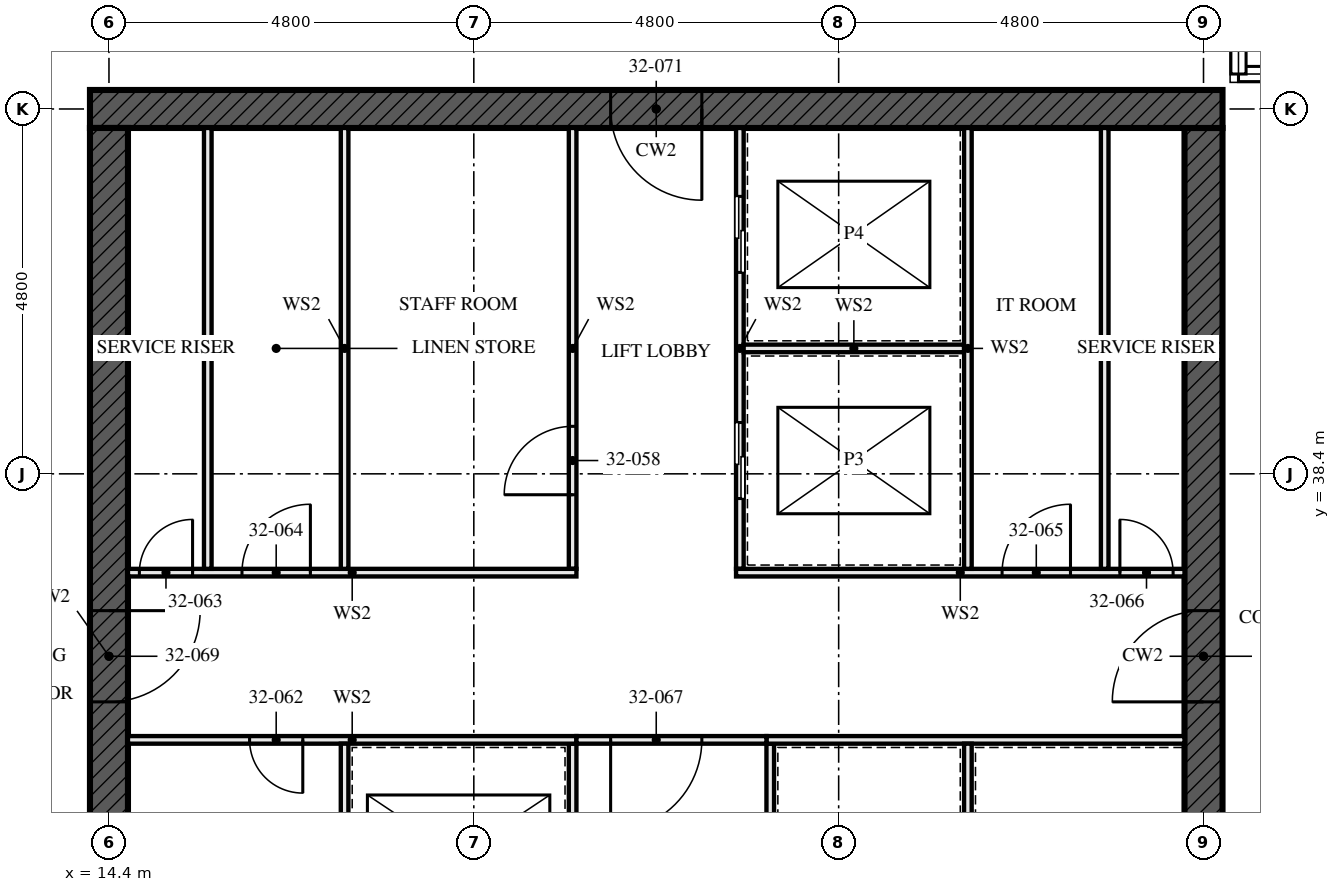
"""IFC4 building model, lengths in metres.
Left out: names, types, materials, properties, quantities, classifications, styles, units other than length and angle.
Written with IfcOpenShell. Run it as: python <this file> out.ifc"""

import sys

from ifc_helpers import new_model, si_unit, direction, frame, frame_2d, origin, place, context, subcontext, project, spatial, rectangle, extrude, element, fill, save


model = new_model("IFC4")
c1 = context("Model", 3, precision=1e-05, world=origin(), true_north=direction((0.0, 1.0)))
c2 = subcontext(c1, "Body", "Model", "MODEL_VIEW")
j1 = project(units=[si_unit("LENGTHUNIT", "METRE"), si_unit("PLANEANGLEUNIT", "RADIAN")], contexts=[c1])
p1 = place(None, origin())
s1 = spatial("IfcSite", under=j1, at=p1, CompositionType="ELEMENT")
p2 = place(p1, origin())
s2 = spatial("IfcBuilding", under=s1, at=p2, CompositionType="ELEMENT")
p3 = place(p2, frame((0.0, 0.0, 119.0)))
s3 = spatial("IfcBuildingStorey", under=s2, at=p3, CompositionType="ELEMENT", Elevation=119.0)
p4 = place(p3, frame((29.05, 43.2, -0.17), z_axis=(0.0, 0.0, 1.0), x_axis=(-1.0, 0.0, 0.0)))
e1 = element("IfcWall", 1, at=p4, inside=s3, PredefinedType="SHEAR", context=c2, shape_type="SweptSolid", body=[
    extrude(rectangle(XDim=14.9, YDim=0.5, at=frame_2d((7.45, 0.0))), origin(), (0.0, 0.0, 1.0), 3.5),
])
p5 = place(p4, frame((6.85, 0.0, 0.17)))
e2 = element("IfcOpeningElement", 2, at=p5, cuts=e1, PredefinedType="OPENING", context=c2, shape_type="SweptSolid", body=[
    extrude(rectangle(XDim=1.2, YDim=2.1, at=frame_2d((0.6, 1.05))), frame((0.0, 0.26, 0.0), z_axis=(0.0, -1.0, 0.0), x_axis=(1.0, 0.0, 0.0)), (0.0, 0.0, 1.0), 0.521),
])
p6 = place(p3, frame((14.4, 42.95, -0.17), z_axis=(0.0, 0.0, 1.0), x_axis=(0.0, -1.0, 0.0)))
e3 = element("IfcWall", 3, at=p6, inside=s3, PredefinedType="SHEAR", context=c2, shape_type="SweptSolid", body=[
    extrude(rectangle(XDim=13.9, YDim=0.5, at=frame_2d((6.95, 0.0))), origin(), (0.0, 0.0, 1.0), 3.5),
])
p7 = place(p6, frame((6.35, 0.0, 0.17)))
e4 = element("IfcOpeningElement", 4, at=p7, cuts=e3, PredefinedType="OPENING", context=c2, shape_type="SweptSolid", body=[
    extrude(rectangle(XDim=1.2, YDim=2.1, at=frame_2d((0.6, 1.05))), frame((0.0, 0.26, 0.0), z_axis=(0.0, -1.0, 0.0), x_axis=(1.0, 0.0, 0.0)), (0.0, 0.0, 1.0), 0.521),
])
p8 = place(p3, frame((28.8, 29.05, -0.17), z_axis=(0.0, 0.0, 1.0), x_axis=(0.0, 1.0, 0.0)))
e5 = element("IfcWall", 5, at=p8, inside=s3, PredefinedType="SHEAR", context=c2, shape_type="SweptSolid", body=[
    extrude(rectangle(XDim=13.9, YDim=0.5, at=frame_2d((6.95, 0.0))), origin(), (0.0, 0.0, 1.0), 3.5),
])
p9 = place(p8, frame((6.35, 0.0, 0.17)))
e6 = element("IfcOpeningElement", 6, at=p9, cuts=e5, PredefinedType="OPENING", context=c2, shape_type="SweptSolid", body=[
    extrude(rectangle(XDim=1.2, YDim=2.1, at=frame_2d((0.6, 1.05))), frame((0.0, 0.26, 0.0), z_axis=(0.0, -1.0, 0.0), x_axis=(1.0, 0.0, 0.0)), (0.0, 0.0, 1.0), 0.521),
])
for number, where, z_axis, x_axis in (
    (7, (15.7, 37.15, 0.0), (0.0, 0.0, 1.0), (0.0, 1.0, 0.0)),
    (8, (27.5, 37.15, 0.0), (0.0, 0.0, 1.0), (0.0, 1.0, 0.0)),
):
    element("IfcWall", number, at=place(p3, frame(where, z_axis=z_axis, x_axis=x_axis)), inside=s3, PredefinedType="SOLIDWALL", context=c2, shape_type="SweptSolid", body=[
        extrude(rectangle(XDim=5.8, YDim=0.1, at=frame_2d((2.9, 0.0))), origin(), (0.0, 0.0, 1.0), 3.33),
    ])
p10 = place(p3, frame((20.5, 29.05, 0.0), z_axis=(0.0, 0.0, 1.0), x_axis=(0.0, 1.0, 0.0)))
e9 = element("IfcWall", 9, at=p10, inside=s3, PredefinedType="SOLIDWALL", context=c2, shape_type="SweptSolid", body=[
    extrude(rectangle(XDim=5.8, YDim=0.1, at=frame_2d((2.9, 0.0))), origin(), (0.0, 0.0, 1.0), 3.33),
])
p11 = place(p10, frame((0.8, 0.0, 0.0)))
e10 = element("IfcOpeningElement", 10, at=p11, cuts=e9, PredefinedType="OPENING", context=c2, shape_type="SweptSolid", body=[
    extrude(rectangle(XDim=1.1, YDim=2.3, at=frame_2d((0.55, 1.15))), frame((0.0, 0.061, 0.0), z_axis=(0.0, -1.0, 0.0), x_axis=(1.0, 0.0, 0.0)), (0.0, 0.0, 1.0), 0.121),
])
p12 = place(p10, frame((3.775, 0.0, 0.0)))
e11 = element("IfcOpeningElement", 11, at=p12, cuts=e9, PredefinedType="OPENING", context=c2, shape_type="SweptSolid", body=[
    extrude(rectangle(XDim=1.1, YDim=2.3, at=frame_2d((0.55, 1.15))), frame((0.0, 0.061, 0.0), z_axis=(0.0, -1.0, 0.0), x_axis=(1.0, 0.0, 0.0)), (0.0, 0.0, 1.0), 0.121),
])
p13 = place(p3, frame((20.5, 37.15, 0.0), z_axis=(0.0, 0.0, 1.0), x_axis=(0.0, 1.0, 0.0)))
e12 = element("IfcWall", 12, at=p13, inside=s3, PredefinedType="SOLIDWALL", context=c2, shape_type="SweptSolid", body=[
    extrude(rectangle(XDim=5.8, YDim=0.1, at=frame_2d((2.9, 0.0))), origin(), (0.0, 0.0, 1.0), 3.33),
])
p14 = place(p13, frame((0.975, 0.0, 0.0)))
e13 = element("IfcOpeningElement", 13, at=p14, cuts=e12, PredefinedType="OPENING", context=c2, shape_type="SweptSolid", body=[
    extrude(rectangle(XDim=0.9, YDim=2.1, at=frame_2d((0.45, 1.05))), frame((0.0, 0.061, 0.0), z_axis=(0.0, -1.0, 0.0), x_axis=(1.0, 0.0, 0.0)), (0.0, 0.0, 1.0), 0.121),
])
p15 = place(p3, frame((22.7, 37.15, 0.0), z_axis=(0.0, 0.0, 1.0), x_axis=(0.0, 1.0, 0.0)))
e14 = element("IfcWall", 14, at=p15, inside=s3, PredefinedType="SOLIDWALL", context=c2, shape_type="SweptSolid", body=[
    extrude(rectangle(XDim=5.8, YDim=0.1, at=frame_2d((2.9, 0.0))), origin(), (0.0, 0.0, 1.0), 3.33),
])
p16 = place(p15, frame((0.925, 0.0, 0.0)))
e15 = element("IfcOpeningElement", 15, at=p16, cuts=e14, PredefinedType="OPENING", context=c2, shape_type="SweptSolid", body=[
    extrude(rectangle(XDim=1.0, YDim=2.1, at=frame_2d((0.5, 1.05))), frame((0.0, 0.061, 0.0), z_axis=(0.0, -1.0, 0.0), x_axis=(1.0, 0.0, 0.0)), (0.0, 0.0, 1.0), 0.121),
])
p17 = place(p15, frame((3.9, 0.0, 0.0)))
e16 = element("IfcOpeningElement", 16, at=p17, cuts=e14, PredefinedType="OPENING", context=c2, shape_type="SweptSolid", body=[
    extrude(rectangle(XDim=1.0, YDim=2.1, at=frame_2d((0.5, 1.05))), frame((0.0, 0.061, 0.0), z_axis=(0.0, -1.0, 0.0), x_axis=(1.0, 0.0, 0.0)), (0.0, 0.0, 1.0), 0.121),
])
p18 = place(p3, frame((23.1, 29.05, 0.0), z_axis=(0.0, 0.0, 1.0), x_axis=(0.0, 1.0, 0.0)))
e17 = element("IfcWall", 17, at=p18, inside=s3, PredefinedType="SOLIDWALL", context=c2, shape_type="SweptSolid", body=[
    extrude(rectangle(XDim=5.8, YDim=0.1, at=frame_2d((2.9, 0.0))), origin(), (0.0, 0.0, 1.0), 3.33),
])
p19 = place(p18, frame((1.0, 0.0, 0.0)))
e18 = element("IfcOpeningElement", 18, at=p19, cuts=e17, PredefinedType="OPENING", context=c2, shape_type="SweptSolid", body=[
    extrude(rectangle(XDim=0.7, YDim=2.1, at=frame_2d((0.35, 1.05))), frame((0.0, 0.061, 0.0), z_axis=(0.0, -1.0, 0.0), x_axis=(1.0, 0.0, 0.0)), (0.0, 0.0, 1.0), 0.121),
])
p20 = place(p3, frame((14.65, 34.9, 0.0), z_axis=(0.0, 0.0, 1.0), x_axis=(1.0, 0.0, 0.0)))
e19 = element("IfcWall", 19, at=p20, inside=s3, PredefinedType="SOLIDWALL", context=c2, shape_type="SweptSolid", body=[
    extrude(rectangle(XDim=5.9, YDim=0.1, at=frame_2d((2.95, 0.0))), origin(), (0.0, 0.0, 1.0), 3.33),
])
p21 = place(p20, frame((1.6, 0.0, 0.0)))
e20 = element("IfcOpeningElement", 20, at=p21, cuts=e19, PredefinedType="OPENING", context=c2, shape_type="SweptSolid", body=[
    extrude(rectangle(XDim=0.7, YDim=2.1, at=frame_2d((0.35, 1.05))), frame((0.0, 0.061, 0.0), z_axis=(0.0, -1.0, 0.0), x_axis=(1.0, 0.0, 0.0)), (0.0, 0.0, 1.0), 0.121),
])
p22 = place(p3, frame((23.05, 34.9, 0.0), z_axis=(0.0, 0.0, 1.0), x_axis=(1.0, 0.0, 0.0)))
e21 = element("IfcWall", 21, at=p22, inside=s3, PredefinedType="SOLIDWALL", context=c2, shape_type="SweptSolid", body=[
    extrude(rectangle(XDim=5.5, YDim=0.1, at=frame_2d((2.75, 0.0))), origin(), (0.0, 0.0, 1.0), 3.33),
])
p23 = place(p3, frame((14.65, 37.1, 0.0), z_axis=(0.0, 0.0, 1.0), x_axis=(1.0, 0.0, 0.0)))
e22 = element("IfcWall", 22, at=p23, inside=s3, PredefinedType="SOLIDWALL", context=c2, shape_type="SweptSolid", body=[
    extrude(rectangle(XDim=5.9, YDim=0.1, at=frame_2d((2.95, 0.0))), origin(), (0.0, 0.0, 1.0), 3.33),
])
p24 = place(p23, frame((0.15, 0.0, 0.0)))
e23 = element("IfcOpeningElement", 23, at=p24, cuts=e22, PredefinedType="OPENING", context=c2, shape_type="SweptSolid", body=[
    extrude(rectangle(XDim=0.7, YDim=2.1, at=frame_2d((0.35, 1.05))), frame((0.0, 0.061, 0.0), z_axis=(0.0, -1.0, 0.0), x_axis=(1.0, 0.0, 0.0)), (0.0, 0.0, 1.0), 0.121),
])
p25 = place(p23, frame((1.5, 0.0, 0.0)))
e24 = element("IfcOpeningElement", 24, at=p25, cuts=e22, PredefinedType="OPENING", context=c2, shape_type="SweptSolid", body=[
    extrude(rectangle(XDim=0.9, YDim=2.1, at=frame_2d((0.45, 1.05))), frame((0.0, 0.061, 0.0), z_axis=(0.0, -1.0, 0.0), x_axis=(1.0, 0.0, 0.0)), (0.0, 0.0, 1.0), 0.121),
])
p26 = place(p3, frame((22.65, 37.1, 0.0), z_axis=(0.0, 0.0, 1.0), x_axis=(1.0, 0.0, 0.0)))
e25 = element("IfcWall", 25, at=p26, inside=s3, PredefinedType="SOLIDWALL", context=c2, shape_type="SweptSolid", body=[
    extrude(rectangle(XDim=5.9, YDim=0.1, at=frame_2d((2.95, 0.0))), origin(), (0.0, 0.0, 1.0), 3.33),
])
p27 = place(p26, frame((3.5, 0.0, 0.0)))
e26 = element("IfcOpeningElement", 26, at=p27, cuts=e25, PredefinedType="OPENING", context=c2, shape_type="SweptSolid", body=[
    extrude(rectangle(XDim=0.9, YDim=2.1, at=frame_2d((0.45, 1.05))), frame((0.0, 0.061, 0.0), z_axis=(0.0, -1.0, 0.0), x_axis=(1.0, 0.0, 0.0)), (0.0, 0.0, 1.0), 0.121),
])
p28 = place(p26, frame((5.05, 0.0, 0.0)))
e27 = element("IfcOpeningElement", 27, at=p28, cuts=e25, PredefinedType="OPENING", context=c2, shape_type="SweptSolid", body=[
    extrude(rectangle(XDim=0.7, YDim=2.1, at=frame_2d((0.35, 1.05))), frame((0.0, 0.061, 0.0), z_axis=(0.0, -1.0, 0.0), x_axis=(1.0, 0.0, 0.0)), (0.0, 0.0, 1.0), 0.121),
])
p29 = place(p3, frame((20.55, 34.9, 0.0), z_axis=(0.0, 0.0, 1.0), x_axis=(1.0, 0.0, 0.0)))
e28 = element("IfcWall", 28, at=p29, inside=s3, PredefinedType="SOLIDWALL", context=c2, shape_type="SweptSolid", body=[
    extrude(rectangle(XDim=2.5, YDim=0.1, at=frame_2d((1.25, 0.0))), origin(), (0.0, 0.0, 1.0), 3.33),
])
p30 = place(p29, frame((0.45, 0.0, 0.0)))
e29 = element("IfcOpeningElement", 29, at=p30, cuts=e28, PredefinedType="OPENING", context=c2, shape_type="SweptSolid", body=[
    extrude(rectangle(XDim=1.2, YDim=2.1, at=frame_2d((0.6, 1.05))), frame((0.0, 0.061, 0.0), z_axis=(0.0, -1.0, 0.0), x_axis=(1.0, 0.0, 0.0)), (0.0, 0.0, 1.0), 0.121),
])
for number, where, z_axis, x_axis in (
    (30, (17.5, 29.05, 0.0), (0.0, 0.0, 1.0), (0.0, 1.0, 0.0)),
    (31, (17.5, 37.15, 0.0), (0.0, 0.0, 1.0), (0.0, 1.0, 0.0)),
):
    element("IfcWall", number, at=place(p3, frame(where, z_axis=z_axis, x_axis=x_axis)), inside=s3, PredefinedType="SOLIDWALL", context=c2, shape_type="SweptSolid", body=[
        extrude(rectangle(XDim=5.8, YDim=0.1, at=frame_2d((2.9, 0.0))), origin(), (0.0, 0.0, 1.0), 3.33),
    ])
p31 = place(p3, frame((22.75, 40.05, 0.0), z_axis=(0.0, 0.0, 1.0), x_axis=(1.0, 0.0, 0.0)))
e32 = element("IfcWall", 32, at=p31, inside=s3, PredefinedType="SOLIDWALL", context=c2, shape_type="SweptSolid", body=[
    extrude(rectangle(XDim=2.9, YDim=0.1, at=frame_2d((1.45, 0.0))), origin(), (0.0, 0.0, 1.0), 3.33),
])
p32 = place(p3, frame((25.7, 37.15, 0.0), z_axis=(0.0, 0.0, 1.0), x_axis=(0.0, 1.0, 0.0)))
e33 = element("IfcWall", 33, at=p32, inside=s3, PredefinedType="SOLIDWALL", context=c2, shape_type="SweptSolid", body=[
    extrude(rectangle(XDim=5.8, YDim=0.1, at=frame_2d((2.9, 0.0))), origin(), (0.0, 0.0, 1.0), 3.33),
])
p33 = place(p3, frame((25.7, 31.95, 0.0), z_axis=(0.0, 0.0, 1.0), x_axis=(0.0, 1.0, 0.0)))
e34 = element("IfcWall", 34, at=p33, inside=s3, PredefinedType="SOLIDWALL", context=c2, shape_type="SweptSolid", body=[
    extrude(rectangle(XDim=2.9, YDim=0.1, at=frame_2d((1.45, 0.0))), origin(), (0.0, 0.0, 1.0), 3.33),
])
p34 = place(p14, origin())
e35 = element("IfcDoor", 35, at=p34, inside=s3, OperationType="SINGLE_SWING_RIGHT", PredefinedType="DOOR", context=c2, shape_type="SweptSolid", body=[
    extrude(rectangle(XDim=0.9, YDim=2.1, at=frame_2d((0.45, 1.05))), frame((0.0, 0.027, 0.0), z_axis=(0.0, -1.0, 0.0), x_axis=(1.0, 0.0, 0.0)), (0.0, 0.0, 1.0), 0.054),
])
fill(e13, e35)
p35 = place(p16, origin())
e36 = element("IfcDoor", 36, at=p35, inside=s3, OperationType="SLIDING_TO_LEFT", PredefinedType="DOOR", context=c2, shape_type="SweptSolid", body=[
    extrude(rectangle(XDim=1.0, YDim=2.1, at=frame_2d((0.5, 1.05))), frame((0.0, 0.05, 0.0), z_axis=(0.0, -1.0, 0.0), x_axis=(1.0, 0.0, 0.0)), (0.0, 0.0, 1.0), 0.1),
])
fill(e15, e36)
p36 = place(p17, origin())
e37 = element("IfcDoor", 37, at=p36, inside=s3, OperationType="SLIDING_TO_LEFT", PredefinedType="DOOR", context=c2, shape_type="SweptSolid", body=[
    extrude(rectangle(XDim=1.0, YDim=2.1, at=frame_2d((0.5, 1.05))), frame((0.0, 0.05, 0.0), z_axis=(0.0, -1.0, 0.0), x_axis=(1.0, 0.0, 0.0)), (0.0, 0.0, 1.0), 0.1),
])
fill(e16, e37)
p37 = place(p21, frame((0.7, 0.0, 0.0), z_axis=(0.0, 0.0, 1.0), x_axis=(-1.0, 0.0, 0.0)))
e38 = element("IfcDoor", 38, at=p37, inside=s3, OperationType="SINGLE_SWING_RIGHT", PredefinedType="DOOR", context=c2, shape_type="SweptSolid", body=[
    extrude(rectangle(XDim=0.7, YDim=2.1, at=frame_2d((0.35, 1.05))), frame((0.0, 0.027, 0.0), z_axis=(0.0, -1.0, 0.0), x_axis=(1.0, 0.0, 0.0)), (0.0, 0.0, 1.0), 0.054),
])
fill(e20, e38)
p38 = place(p24, origin())
e39 = element("IfcDoor", 39, at=p38, inside=s3, OperationType="SINGLE_SWING_LEFT", PredefinedType="DOOR", context=c2, shape_type="SweptSolid", body=[
    extrude(rectangle(XDim=0.7, YDim=2.1, at=frame_2d((0.35, 1.05))), frame((0.0, 0.027, 0.0), z_axis=(0.0, -1.0, 0.0), x_axis=(1.0, 0.0, 0.0)), (0.0, 0.0, 1.0), 0.054),
])
fill(e23, e39)
p39 = place(p25, origin())
e40 = element("IfcDoor", 40, at=p39, inside=s3, OperationType="SINGLE_SWING_LEFT", PredefinedType="DOOR", context=c2, shape_type="SweptSolid", body=[
    extrude(rectangle(XDim=0.9, YDim=2.1, at=frame_2d((0.45, 1.05))), frame((0.0, 0.027, 0.0), z_axis=(0.0, -1.0, 0.0), x_axis=(1.0, 0.0, 0.0)), (0.0, 0.0, 1.0), 0.054),
])
fill(e24, e40)
p40 = place(p27, origin())
e41 = element("IfcDoor", 41, at=p40, inside=s3, OperationType="SINGLE_SWING_LEFT", PredefinedType="DOOR", context=c2, shape_type="SweptSolid", body=[
    extrude(rectangle(XDim=0.9, YDim=2.1, at=frame_2d((0.45, 1.05))), frame((0.0, 0.027, 0.0), z_axis=(0.0, -1.0, 0.0), x_axis=(1.0, 0.0, 0.0)), (0.0, 0.0, 1.0), 0.054),
])
fill(e26, e41)
p41 = place(p28, origin())
e42 = element("IfcDoor", 42, at=p41, inside=s3, OperationType="SINGLE_SWING_RIGHT", PredefinedType="DOOR", context=c2, shape_type="SweptSolid", body=[
    extrude(rectangle(XDim=0.7, YDim=2.1, at=frame_2d((0.35, 1.05))), frame((0.0, 0.027, 0.0), z_axis=(0.0, -1.0, 0.0), x_axis=(1.0, 0.0, 0.0)), (0.0, 0.0, 1.0), 0.054),
])
fill(e27, e42)
p42 = place(p30, frame((1.2, 0.0, 0.0), z_axis=(0.0, 0.0, 1.0), x_axis=(-1.0, 0.0, 0.0)))
e43 = element("IfcDoor", 43, at=p42, inside=s3, OperationType="SINGLE_SWING_LEFT", PredefinedType="DOOR", context=c2, shape_type="SweptSolid", body=[
    extrude(rectangle(XDim=1.2, YDim=2.1, at=frame_2d((0.6, 1.05))), frame((0.0, 0.027, 0.0), z_axis=(0.0, -1.0, 0.0), x_axis=(1.0, 0.0, 0.0)), (0.0, 0.0, 1.0), 0.054),
])
fill(e29, e43)
p43 = place(p7, origin())
e44 = element("IfcDoor", 44, at=p43, inside=s3, OperationType="SINGLE_SWING_LEFT", PredefinedType="DOOR", context=c2, shape_type="SweptSolid", body=[
    extrude(rectangle(XDim=1.2, YDim=2.1, at=frame_2d((0.6, 1.05))), frame((0.0, 0.027, 0.0), z_axis=(0.0, -1.0, 0.0), x_axis=(1.0, 0.0, 0.0)), (0.0, 0.0, 1.0), 0.054),
])
fill(e4, e44)
p44 = place(p9, origin())
e45 = element("IfcDoor", 45, at=p44, inside=s3, OperationType="SINGLE_SWING_LEFT", PredefinedType="DOOR", context=c2, shape_type="SweptSolid", body=[
    extrude(rectangle(XDim=1.2, YDim=2.1, at=frame_2d((0.6, 1.05))), frame((0.0, 0.027, 0.0), z_axis=(0.0, -1.0, 0.0), x_axis=(1.0, 0.0, 0.0)), (0.0, 0.0, 1.0), 0.054),
])
fill(e6, e45)
p45 = place(p5, origin())
e46 = element("IfcDoor", 46, at=p45, inside=s3, OperationType="SINGLE_SWING_LEFT", PredefinedType="DOOR", context=c2, shape_type="SweptSolid", body=[
    extrude(rectangle(XDim=1.2, YDim=2.1, at=frame_2d((0.6, 1.05))), frame((0.0, 0.027, 0.0), z_axis=(0.0, -1.0, 0.0), x_axis=(1.0, 0.0, 0.0)), (0.0, 0.0, 1.0), 0.054),
])
fill(e2, e46)
save(model, sys.argv[1])
